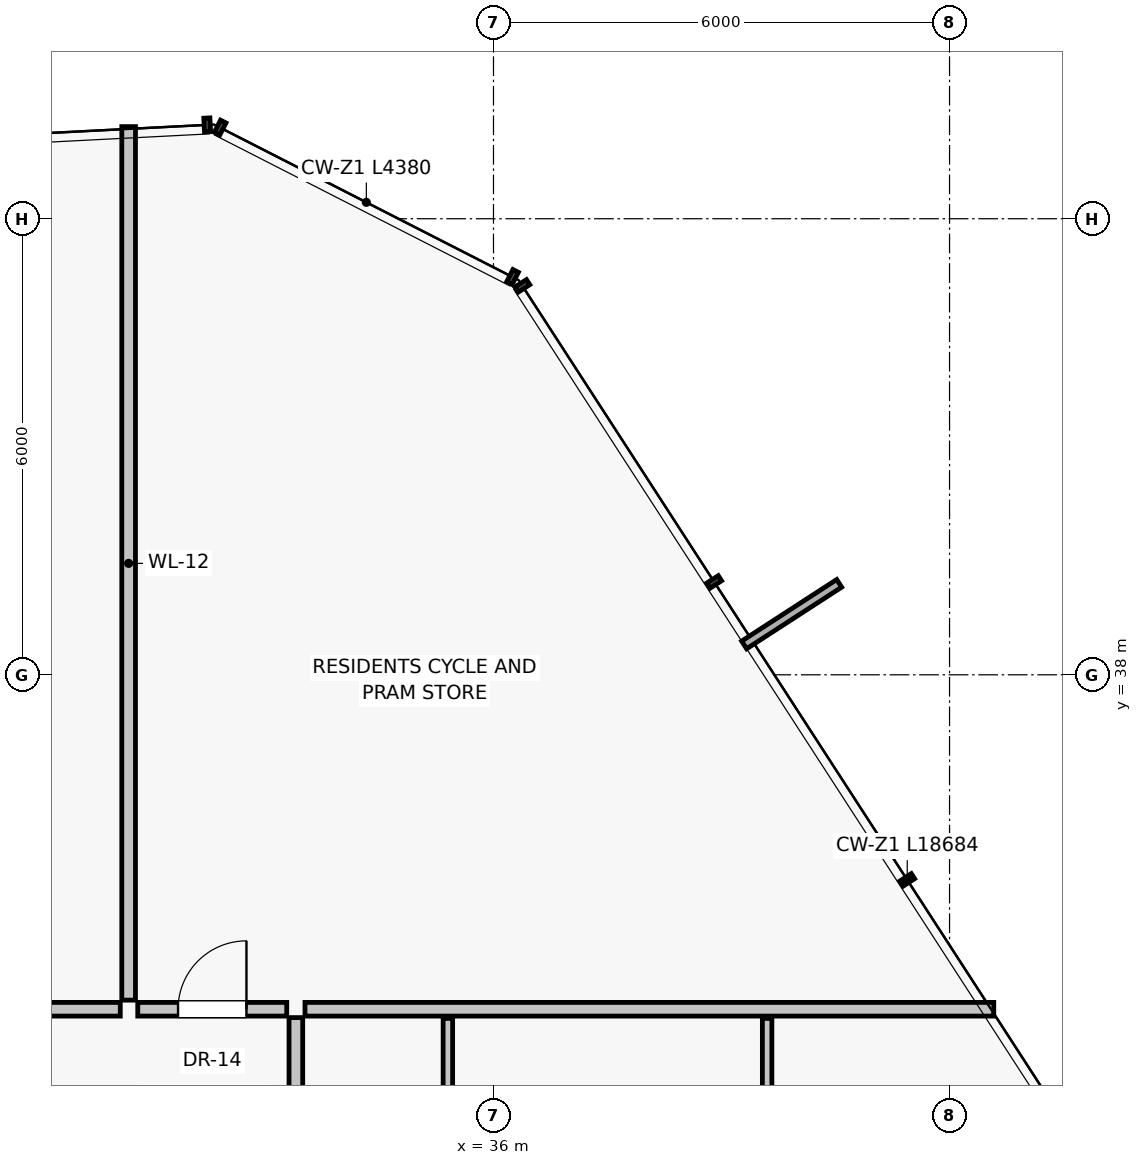
"""IFC4 building model, lengths in metres.
Left out: names, types, materials, properties, quantities, classifications, styles, units other than length and angle.
Written with IfcOpenShell. Run it as: python <this file> out.ifc"""

import sys

from ifc_helpers import new_model, si_unit, direction, frame, frame_2d, origin, place, context, subcontext, project, spatial, rectangle, extrude, source, transform, mapped, element, fill, save


model = new_model("IFC4")
c1 = context("Model", 3, precision=1e-05, world=origin(), true_north=direction((0.0, 1.0)))
c2 = subcontext(c1, "Body", "Model", "MODEL_VIEW")
j1 = project(units=[si_unit("LENGTHUNIT", "METRE"), si_unit("PLANEANGLEUNIT", "RADIAN")], contexts=[c1])
p1 = place(None, origin())
s1 = spatial("IfcSite", under=j1, at=p1, CompositionType="ELEMENT")
p2 = place(p1, origin())
s2 = spatial("IfcBuilding", under=s1, at=p2, CompositionType="ELEMENT")
p3 = place(p2, frame((0.0, 0.0, 33.8)))
s3 = spatial("IfcBuildingStorey", under=s2, at=p3, CompositionType="ELEMENT", Elevation=33.8)
p4 = place(p3, frame((31.2, 33.72, 0.0), z_axis=(0.0, 0.0, 1.0), x_axis=(0.0, 1.0, 0.0)))
e1 = element("IfcWall", 1, at=p4, inside=s3, PredefinedType="PARTITIONING", context=c2, shape_type="SweptSolid", body=[
    extrude(rectangle(XDim=11.492, YDim=0.18, at=frame_2d((5.746, 0.0))), origin(), (0.0, 0.0, 1.0), 3.0),
])
p5 = place(p3, frame((24.962, 33.6, 0.0), z_axis=(0.0, 0.0, 1.0), x_axis=(1.0, 0.0, 0.0)))
e2 = element("IfcWall", 2, at=p5, inside=s3, PredefinedType="PARTITIONING", context=c2, shape_type="SweptSolid", body=[
    extrude(rectangle(XDim=6.128, YDim=0.18, at=frame_2d((3.064, 0.0))), origin(), (0.0, 0.0, 1.0), 3.0),
])
p6 = place(p5, frame((3.736, 0.0, 0.0)))
e3 = element("IfcOpeningElement", 3, at=p6, cuts=e2, PredefinedType="OPENING", context=c2, shape_type="SweptSolid", body=[
    extrude(rectangle(XDim=0.95, YDim=2.02, at=frame_2d((0.475, 1.01))), frame((0.0, 0.1, 0.0), z_axis=(0.0, -1.0, 0.0), x_axis=(1.0, 0.0, 0.0)), (0.0, 0.0, 1.0), 0.2),
])
p7 = place(p3, frame((33.52, 33.6, 0.0), z_axis=(0.0, 0.0, 1.0), x_axis=(1.0, 0.0, 0.0)))
e4 = element("IfcWall", 4, at=p7, inside=s3, PredefinedType="PARTITIONING", context=c2, shape_type="SweptSolid", body=[
    extrude(rectangle(XDim=9.062, YDim=0.18, at=frame_2d((4.531, 0.0))), origin(), (0.0, 0.0, 1.0), 3.0),
])
p8 = place(p3, frame((33.4, 24.618, 0.0), z_axis=(0.0, 0.0, 1.0), x_axis=(0.0, 1.0, 0.0)))
e5 = element("IfcWall", 5, at=p8, inside=s3, PredefinedType="PARTITIONING", context=c2, shape_type="SweptSolid", body=[
    extrude(rectangle(XDim=8.872, YDim=0.18, at=frame_2d((4.436, 0.0))), origin(), (0.0, 0.0, 1.0), 3.0),
])
p9 = place(p8, frame((2.995, 0.0, 0.0)))
e6 = element("IfcOpeningElement", 6, at=p9, cuts=e5, PredefinedType="OPENING", context=c2, shape_type="SweptSolid", body=[
    extrude(rectangle(XDim=0.95, YDim=2.02, at=frame_2d((0.475, 1.01))), frame((0.0, 0.1, 0.0), z_axis=(0.0, -1.0, 0.0), x_axis=(1.0, 0.0, 0.0)), (0.0, 0.0, 1.0), 0.2),
])
for number, where, z_axis, x_axis in (
    (7, (35.4, 29.518, 0.0), (0.0, 0.0, 1.0), (0.0, 1.0, 0.0)),
    (8, (39.6, 29.518, 0.0), (0.0, 0.0, 1.0), (0.0, 1.0, 0.0)),
):
    element("IfcWall", number, at=place(p3, frame(where, z_axis=z_axis, x_axis=x_axis)), inside=s3, PredefinedType="PARTITIONING", context=c2, shape_type="SweptSolid", body=[
        extrude(rectangle(XDim=3.962, YDim=0.125, at=frame_2d((1.981, 0.0))), origin(), (0.0, 0.0, 1.0), 3.0),
    ])
p10 = place(p3, frame((31.32, 33.6, 0.0), z_axis=(0.0, 0.0, 1.0), x_axis=(1.0, 0.0, 0.0)))
e9 = element("IfcWall", 9, at=p10, inside=s3, PredefinedType="PARTITIONING", context=c2, shape_type="SweptSolid", body=[
    extrude(rectangle(XDim=1.96, YDim=0.18, at=frame_2d((0.98, 0.0))), origin(), (0.0, 0.0, 1.0), 3.0),
])
p11 = place(p10, frame((0.53, 0.0, 0.0)))
e10 = element("IfcOpeningElement", 10, at=p11, cuts=e9, PredefinedType="OPENING", context=c2, shape_type="SweptSolid", body=[
    extrude(rectangle(XDim=0.9, YDim=2.01, at=frame_2d((0.45, 1.005))), frame((0.0, 0.1, 0.0), z_axis=(0.0, -1.0, 0.0), x_axis=(1.0, 0.0, 0.0)), (0.0, 0.0, 1.0), 0.2),
])
m1 = source(origin(), c2, "Body", "SweptSolid", [
    extrude(rectangle(XDim=0.9, YDim=2.01, at=frame_2d((0.45, 1.005))), frame((0.0, 0.025, 0.0), z_axis=(0.0, -1.0, 0.0), x_axis=(1.0, 0.0, 0.0)), (0.0, 0.0, 1.0), 0.05),
])
p12 = place(p11, origin())
e11 = element("IfcDoor", 11, at=p12, inside=s3, OperationType="SINGLE_SWING_RIGHT", PredefinedType="DOOR", context=c2, shape_type="MappedRepresentation", body=[
    mapped(m1, transform((0.0, 0.0, 0.0), scale=1.0)),
])
fill(e10, e11)
save(model, sys.argv[1])
